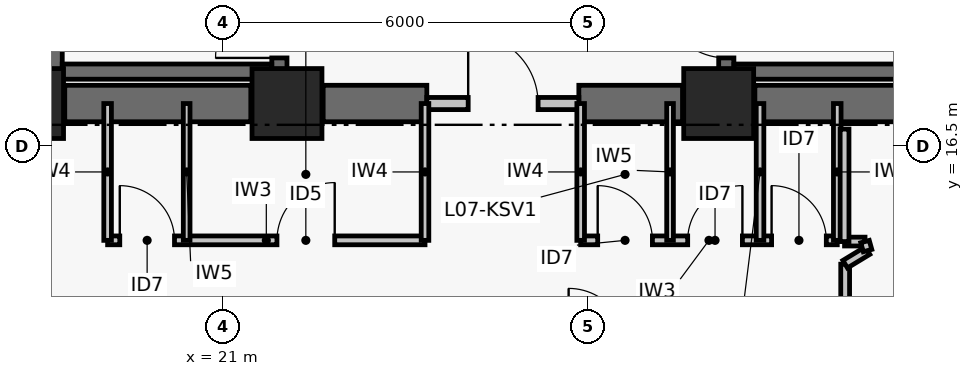
"""IFC4 building model, lengths in metres.
Left out: names, types, materials, properties, quantities, classifications, styles, units other than length and angle.
Written with IfcOpenShell. Run it as: python <this file> out.ifc"""

import sys

from ifc_helpers import new_model, si_unit, direction, frame, frame_2d, origin, origin_2d, place, context, subcontext, project, spatial, rectangle, extrude, element, fill, save


model = new_model("IFC4")
c1 = context("Model", 3, precision=1e-05, world=origin(), true_north=direction((0.0, 1.0)))
c2 = subcontext(c1, "Body", "Model", "MODEL_VIEW")
j1 = project(units=[si_unit("LENGTHUNIT", "METRE"), si_unit("PLANEANGLEUNIT", "RADIAN")], contexts=[c1])
p1 = place(None, origin())
s1 = spatial("IfcSite", under=j1, at=p1, CompositionType="ELEMENT")
p2 = place(p1, origin())
s2 = spatial("IfcBuilding", under=s1, at=p2, CompositionType="ELEMENT")
p3 = place(p2, frame((0.0, 0.0, 35.04)))
s3 = spatial("IfcBuildingStorey", under=s2, at=p3, CompositionType="ELEMENT", Elevation=35.04)
for number, where, z_axis, x_axis in (
    (1, (17.8, 17.2, 0.0), (0.0, 0.0, 1.0), (1.0, 0.0, 0.0)),
    (2, (22.05, 17.2, 0.0), (0.0, 0.0, 1.0), (1.0, 0.0, 0.0)),
    (3, (29.15, 17.2, 0.0), (0.0, 0.0, 1.0), (1.0, 0.0, 0.0)),
):
    element("IfcColumn", number, at=place(p3, frame(where, z_axis=z_axis, x_axis=x_axis)), inside=s3, PredefinedType="COLUMN", context=c2, shape_type="SweptSolid", body=[
        extrude(rectangle(XDim=1.15, YDim=1.15, at=origin_2d()), origin(), (0.0, 0.0, 1.0), 3.72),
    ])
p4 = place(p3, frame((18.395, 17.2, 0.0), z_axis=(0.0, 0.0, 1.0), x_axis=(1.0, 0.0, 0.0)))
e4 = element("IfcWall", 4, at=p4, inside=s3, PredefinedType="SHEAR", context=c2, shape_type="SweptSolid", body=[
    extrude(rectangle(XDim=3.06, YDim=0.6, at=frame_2d((1.53, 0.0))), origin(), (0.0, 0.0, 1.0), 3.47),
])
p5 = place(p3, frame((22.645, 17.2, 0.0), z_axis=(0.0, 0.0, 1.0), x_axis=(1.0, 0.0, 0.0)))
e5 = element("IfcWall", 5, at=p5, inside=s3, PredefinedType="SHEAR", context=c2, shape_type="SweptSolid", body=[
    extrude(rectangle(XDim=1.705, YDim=0.6, at=frame_2d((0.853, 0.0))), origin(), (0.0, 0.0, 1.0), 3.47),
])
p6 = place(p3, frame((26.85, 17.2, 0.0), z_axis=(0.0, 0.0, 1.0), x_axis=(1.0, 0.0, 0.0)))
e6 = element("IfcWall", 6, at=p6, inside=s3, PredefinedType="SHEAR", context=c2, shape_type="SweptSolid", body=[
    extrude(rectangle(XDim=1.705, YDim=0.6, at=frame_2d((0.853, 0.0))), origin(), (0.0, 0.0, 1.0), 3.47),
])
p7 = place(p3, frame((29.745, 17.2, 0.0), z_axis=(0.0, 0.0, 1.0), x_axis=(1.0, 0.0, 0.0)))
e7 = element("IfcWall", 7, at=p7, inside=s3, PredefinedType="SHEAR", context=c2, shape_type="SweptSolid", body=[
    extrude(rectangle(XDim=3.06, YDim=0.6, at=frame_2d((1.53, 0.0))), origin(), (0.0, 0.0, 1.0), 3.47),
])
p8 = place(p3, frame((18.229, 17.6, 0.0), z_axis=(0.0, 0.0, 1.0), x_axis=(0.0, 1.0, 0.0)))
e8 = element("IfcWall", 8, at=p8, inside=s3, PredefinedType="SHEAR", context=c2, shape_type="SweptSolid", body=[
    extrude(rectangle(XDim=8.8, YDim=0.25, at=frame_2d((4.4, 0.0))), origin(), (0.0, 0.0, 1.0), 3.47),
])
p9 = place(p3, frame((21.925, 17.6, 0.0), z_axis=(0.0, 0.0, 1.0), x_axis=(0.0, 1.0, 0.0)))
e9 = element("IfcWall", 9, at=p9, inside=s3, PredefinedType="SHEAR", context=c2, shape_type="SweptSolid", body=[
    extrude(rectangle(XDim=8.8, YDim=0.25, at=frame_2d((4.4, 0.0))), origin(), (0.0, 0.0, 1.0), 3.47),
])
p10 = place(p9, frame((0.35, 0.0, 0.0)))
e10 = element("IfcOpeningElement", 10, at=p10, cuts=e9, PredefinedType="OPENING", context=c2, shape_type="SweptSolid", body=[
    extrude(rectangle(XDim=1.05, YDim=2.08, at=frame_2d((0.525, 1.04))), frame((0.0, 0.135, 0.0), z_axis=(0.0, -1.0, 0.0), x_axis=(1.0, 0.0, 0.0)), (0.0, 0.0, 1.0), 0.27),
])
p11 = place(p3, frame((18.354, 17.725, 0.0), z_axis=(0.0, 0.0, 1.0), x_axis=(1.0, 0.0, 0.0)))
e11 = element("IfcWall", 11, at=p11, inside=s3, PredefinedType="SHEAR", context=c2, shape_type="SweptSolid", body=[
    extrude(rectangle(XDim=3.446, YDim=0.25, at=frame_2d((1.723, 0.0))), origin(), (0.0, 0.0, 1.0), 3.47),
])
p12 = place(p3, frame((29.275, 17.6, 0.0), z_axis=(0.0, 0.0, 1.0), x_axis=(0.0, 1.0, 0.0)))
e12 = element("IfcWall", 12, at=p12, inside=s3, PredefinedType="SHEAR", context=c2, shape_type="SweptSolid", body=[
    extrude(rectangle(XDim=8.8, YDim=0.25, at=frame_2d((4.4, 0.0))), origin(), (0.0, 0.0, 1.0), 3.47),
])
p13 = place(p12, frame((0.35, 0.0, 0.0)))
e13 = element("IfcOpeningElement", 13, at=p13, cuts=e12, PredefinedType="OPENING", context=c2, shape_type="SweptSolid", body=[
    extrude(rectangle(XDim=1.05, YDim=2.08, at=frame_2d((0.525, 1.04))), frame((0.0, 0.135, 0.0), z_axis=(0.0, -1.0, 0.0), x_axis=(1.0, 0.0, 0.0)), (0.0, 0.0, 1.0), 0.27),
])
p14 = place(p3, frame((29.4, 17.725, 0.0), z_axis=(0.0, 0.0, 1.0), x_axis=(1.0, 0.0, 0.0)))
e14 = element("IfcWall", 14, at=p14, inside=s3, PredefinedType="SHEAR", context=c2, shape_type="SweptSolid", body=[
    extrude(rectangle(XDim=3.446, YDim=0.25, at=frame_2d((1.723, 0.0))), origin(), (0.0, 0.0, 1.0), 3.47),
])
p15 = place(p3, frame((24.35, 17.2, 0.0), z_axis=(0.0, 0.0, 1.0), x_axis=(1.0, 0.0, 0.0)))
e15 = element("IfcWall", 15, at=p15, inside=s3, PredefinedType="PARTITIONING", context=c2, shape_type="SweptSolid", body=[
    extrude(rectangle(XDim=2.5, YDim=0.2, at=frame_2d((1.25, 0.0))), origin(), (0.0, 0.0, 1.0), 2.6),
])
p16 = place(p15, frame((0.68, 0.0, 0.0)))
e16 = element("IfcOpeningElement", 16, at=p16, cuts=e15, PredefinedType="OPENING", context=c2, shape_type="SweptSolid", body=[
    extrude(rectangle(XDim=1.15, YDim=2.08, at=frame_2d((0.575, 1.04))), frame((0.0, 0.11, 0.0), z_axis=(0.0, -1.0, 0.0), x_axis=(1.0, 0.0, 0.0)), (0.0, 0.0, 1.0), 0.22),
])
p17 = place(p3, frame((19.1, 14.95, 0.0), z_axis=(0.0, 0.0, 1.0), x_axis=(1.0, 0.0, 0.0)))
e17 = element("IfcWall", 17, at=p17, inside=s3, PredefinedType="PARTITIONING", context=c2, shape_type="SweptSolid", body=[
    extrude(rectangle(XDim=5.22, YDim=0.145, at=frame_2d((2.61, 0.0))), origin(), (0.0, 0.0, 1.0), 2.6),
])
p18 = place(p17, frame((0.2, 0.0, 0.0)))
e18 = element("IfcOpeningElement", 18, at=p18, cuts=e17, PredefinedType="OPENING", context=c2, shape_type="SweptSolid", body=[
    extrude(rectangle(XDim=0.9, YDim=2.02, at=frame_2d((0.45, 1.01))), frame((0.0, 0.083, 0.0), z_axis=(0.0, -1.0, 0.0), x_axis=(1.0, 0.0, 0.0)), (0.0, 0.0, 1.0), 0.165),
])
p19 = place(p17, frame((2.785, 0.0, 0.0)))
e19 = element("IfcOpeningElement", 19, at=p19, cuts=e17, PredefinedType="OPENING", context=c2, shape_type="SweptSolid", body=[
    extrude(rectangle(XDim=0.95, YDim=2.06, at=frame_2d((0.475, 1.03))), frame((0.0, 0.083, 0.0), z_axis=(0.0, -1.0, 0.0), x_axis=(1.0, 0.0, 0.0)), (0.0, 0.0, 1.0), 0.165),
])
p20 = place(p3, frame((26.88, 14.95, 0.0), z_axis=(0.0, 0.0, 1.0), x_axis=(1.0, 0.0, 0.0)))
e20 = element("IfcWall", 20, at=p20, inside=s3, PredefinedType="PARTITIONING", context=c2, shape_type="SweptSolid", body=[
    extrude(rectangle(XDim=4.22, YDim=0.145, at=frame_2d((2.11, 0.0))), origin(), (0.0, 0.0, 1.0), 3.0),
])
p21 = place(p20, frame((0.28, 0.0, 0.0)))
e21 = element("IfcOpeningElement", 21, at=p21, cuts=e20, PredefinedType="OPENING", context=c2, shape_type="SweptSolid", body=[
    extrude(rectangle(XDim=0.9, YDim=2.02, at=frame_2d((0.45, 1.01))), frame((0.0, 0.083, 0.0), z_axis=(0.0, -1.0, 0.0), x_axis=(1.0, 0.0, 0.0)), (0.0, 0.0, 1.0), 0.165),
])
p22 = place(p20, frame((1.76, 0.0, 0.0)))
e22 = element("IfcOpeningElement", 22, at=p22, cuts=e20, PredefinedType="OPENING", context=c2, shape_type="SweptSolid", body=[
    extrude(rectangle(XDim=0.9, YDim=2.02, at=frame_2d((0.45, 1.01))), frame((0.0, 0.083, 0.0), z_axis=(0.0, -1.0, 0.0), x_axis=(1.0, 0.0, 0.0)), (0.0, 0.0, 1.0), 0.165),
])
p23 = place(p20, frame((3.14, 0.0, 0.0)))
e23 = element("IfcOpeningElement", 23, at=p23, cuts=e20, PredefinedType="OPENING", context=c2, shape_type="SweptSolid", body=[
    extrude(rectangle(XDim=0.9, YDim=2.02, at=frame_2d((0.45, 1.01))), frame((0.0, 0.083, 0.0), z_axis=(0.0, -1.0, 0.0), x_axis=(1.0, 0.0, 0.0)), (0.0, 0.0, 1.0), 0.165),
])
p24 = place(p3, frame((19.1, 14.95, 0.0), z_axis=(0.0, 0.0, 1.0), x_axis=(0.0, 1.0, 0.0)))
e24 = element("IfcWall", 24, at=p24, inside=s3, PredefinedType="PARTITIONING", context=c2, shape_type="SweptSolid", body=[
    extrude(rectangle(XDim=2.25, YDim=0.125, at=frame_2d((1.125, 0.0))), origin(), (0.0, 0.0, 1.0), 2.6),
])
p25 = place(p3, frame((20.4, 14.95, 0.0), z_axis=(0.0, 0.0, 1.0), x_axis=(0.0, 1.0, 0.0)))
e25 = element("IfcWall", 25, at=p25, inside=s3, PredefinedType="PARTITIONING", context=c2, shape_type="SweptSolid", body=[
    extrude(rectangle(XDim=2.25, YDim=0.11, at=frame_2d((1.125, 0.0))), origin(), (0.0, 0.0, 1.0), 2.6),
])
for number, where, z_axis, x_axis in (
    (26, (24.32, 14.95, 0.0), (0.0, 0.0, 1.0), (0.0, 1.0, 0.0)),
    (27, (26.88, 14.95, 0.0), (0.0, 0.0, 1.0), (0.0, 1.0, 0.0)),
):
    element("IfcWall", number, at=place(p3, frame(where, z_axis=z_axis, x_axis=x_axis)), inside=s3, PredefinedType="PARTITIONING", context=c2, shape_type="SweptSolid", body=[
        extrude(rectangle(XDim=2.25, YDim=0.125, at=frame_2d((1.125, 0.0))), origin(), (0.0, 0.0, 1.0), 2.6),
    ])
p26 = place(p3, frame((28.35, 14.95, 0.0), z_axis=(0.0, 0.0, 1.0), x_axis=(0.0, 1.0, 0.0)))
e28 = element("IfcWall", 28, at=p26, inside=s3, PredefinedType="PARTITIONING", context=c2, shape_type="SweptSolid", body=[
    extrude(rectangle(XDim=2.25, YDim=0.11, at=frame_2d((1.125, 0.0))), origin(), (0.0, 0.0, 1.0), 2.6),
])
for number, where, z_axis, x_axis in (
    (29, (29.83, 14.95, 0.0), (0.0, 0.0, 1.0), (0.0, 1.0, 0.0)),
    (30, (31.1, 14.95, 0.0), (0.0, 0.0, 1.0), (0.0, 1.0, 0.0)),
):
    element("IfcWall", number, at=place(p3, frame(where, z_axis=z_axis, x_axis=x_axis)), inside=s3, PredefinedType="PARTITIONING", context=c2, shape_type="SweptSolid", body=[
        extrude(rectangle(XDim=2.25, YDim=0.125, at=frame_2d((1.125, 0.0))), origin(), (0.0, 0.0, 1.0), 2.6),
    ])
p27 = place(p3, frame((31.23, 13.29, 0.0), z_axis=(0.0, 0.0, 1.0), x_axis=(0.0, 1.0, 0.0)))
e31 = element("IfcWall", 31, at=p27, inside=s3, PredefinedType="PARTITIONING", context=c2, shape_type="SweptSolid", body=[
    extrude(rectangle(XDim=1.268, YDim=0.145, at=frame_2d((0.634, 0.0))), origin(), (0.0, 0.0, 1.0), 2.85),
])
p28 = place(p3, frame((31.23, 14.558, 0.0), z_axis=(0.0, 0.0, 1.0), x_axis=(0.854931196424, 0.518741408971, 0.0)))
e32 = element("IfcWall", 32, at=p28, inside=s3, PredefinedType="PARTITIONING", context=c2, shape_type="SweptSolid", body=[
    extrude(rectangle(XDim=0.431, YDim=0.145, at=frame_2d((0.215, 0.0))), origin(), (0.0, 0.0, 1.0), 3.0),
])
p29 = place(p3, frame((31.557, 14.93, 0.0), z_axis=(0.0, 0.0, 1.0), x_axis=(-1.0, 0.0, 0.0)))
e33 = element("IfcWall", 33, at=p29, inside=s3, PredefinedType="PARTITIONING", context=c2, shape_type="SweptSolid", body=[
    extrude(rectangle(XDim=0.337, YDim=0.145, at=frame_2d((0.168, 0.0))), origin(), (0.0, 0.0, 1.0), 3.0),
])
p30 = place(p3, frame((31.22, 14.93, 0.0), z_axis=(0.0, 0.0, 1.0), x_axis=(0.0, 1.0, 0.0)))
e34 = element("IfcWall", 34, at=p30, inside=s3, PredefinedType="PARTITIONING", context=c2, shape_type="SweptSolid", body=[
    extrude(rectangle(XDim=1.85, YDim=0.145, at=frame_2d((0.925, 0.0))), origin(), (0.0, 0.0, 1.0), 2.6),
])
p31 = place(p3, frame((31.598, 14.781, 0.0), z_axis=(0.0, 0.0, 1.0), x_axis=(-0.269277388617, 0.963062660464, 0.0)))
e35 = element("IfcWall", 35, at=p31, inside=s3, PredefinedType="PARTITIONING", context=c2, shape_type="SweptSolid", body=[
    extrude(rectangle(XDim=0.154, YDim=0.145, at=frame_2d((0.077, 0.0))), origin(), (0.0, 0.0, 1.0), 3.0),
])
p32 = place(p10, origin())
e36 = element("IfcDoor", 36, at=p32, inside=s3, OperationType="SINGLE_SWING_LEFT", PredefinedType="DOOR", context=c2, shape_type="SweptSolid", body=[
    extrude(rectangle(XDim=1.05, YDim=2.08, at=frame_2d((0.525, 1.04))), frame((0.0, 0.025, 0.0), z_axis=(0.0, -1.0, 0.0), x_axis=(1.0, 0.0, 0.0)), (0.0, 0.0, 1.0), 0.05),
])
fill(e10, e36)
p33 = place(p13, origin())
e37 = element("IfcDoor", 37, at=p33, inside=s3, OperationType="SINGLE_SWING_RIGHT", PredefinedType="DOOR", context=c2, shape_type="SweptSolid", body=[
    extrude(rectangle(XDim=1.05, YDim=2.08, at=frame_2d((0.525, 1.04))), frame((0.0, 0.025, 0.0), z_axis=(0.0, -1.0, 0.0), x_axis=(1.0, 0.0, 0.0)), (0.0, 0.0, 1.0), 0.05),
])
fill(e13, e37)
p34 = place(p16, origin())
e38 = element("IfcDoor", 38, at=p34, inside=s3, OperationType="SINGLE_SWING_LEFT", PredefinedType="DOOR", context=c2, shape_type="SweptSolid", body=[
    extrude(rectangle(XDim=1.15, YDim=2.08, at=frame_2d((0.575, 1.04))), frame((0.0, 0.025, 0.0), z_axis=(0.0, -1.0, 0.0), x_axis=(1.0, 0.0, 0.0)), (0.0, 0.0, 1.0), 0.05),
])
fill(e16, e38)
p35 = place(p18, origin())
e39 = element("IfcDoor", 39, at=p35, inside=s3, OperationType="SINGLE_SWING_LEFT", PredefinedType="DOOR", context=c2, shape_type="SweptSolid", body=[
    extrude(rectangle(XDim=0.9, YDim=2.02, at=frame_2d((0.45, 1.01))), frame((0.0, 0.025, 0.0), z_axis=(0.0, -1.0, 0.0), x_axis=(1.0, 0.0, 0.0)), (0.0, 0.0, 1.0), 0.05),
])
fill(e18, e39)
p36 = place(p19, origin())
e40 = element("IfcDoor", 40, at=p36, inside=s3, OperationType="SINGLE_SWING_RIGHT", PredefinedType="DOOR", context=c2, shape_type="SweptSolid", body=[
    extrude(rectangle(XDim=0.95, YDim=2.06, at=frame_2d((0.475, 1.03))), frame((0.0, 0.025, 0.0), z_axis=(0.0, -1.0, 0.0), x_axis=(1.0, 0.0, 0.0)), (0.0, 0.0, 1.0), 0.05),
])
fill(e19, e40)
p37 = place(p21, origin())
e41 = element("IfcDoor", 41, at=p37, inside=s3, OperationType="SINGLE_SWING_LEFT", PredefinedType="DOOR", context=c2, shape_type="SweptSolid", body=[
    extrude(rectangle(XDim=0.9, YDim=2.02, at=frame_2d((0.45, 1.01))), frame((0.0, 0.025, 0.0), z_axis=(0.0, -1.0, 0.0), x_axis=(1.0, 0.0, 0.0)), (0.0, 0.0, 1.0), 0.05),
])
fill(e21, e41)
p38 = place(p22, origin())
e42 = element("IfcDoor", 42, at=p38, inside=s3, OperationType="SINGLE_SWING_RIGHT", PredefinedType="DOOR", context=c2, shape_type="SweptSolid", body=[
    extrude(rectangle(XDim=0.9, YDim=2.02, at=frame_2d((0.45, 1.01))), frame((0.0, 0.025, 0.0), z_axis=(0.0, -1.0, 0.0), x_axis=(1.0, 0.0, 0.0)), (0.0, 0.0, 1.0), 0.05),
])
fill(e22, e42)
p39 = place(p23, origin())
e43 = element("IfcDoor", 43, at=p39, inside=s3, OperationType="SINGLE_SWING_LEFT", PredefinedType="DOOR", context=c2, shape_type="SweptSolid", body=[
    extrude(rectangle(XDim=0.9, YDim=2.02, at=frame_2d((0.45, 1.01))), frame((0.0, 0.025, 0.0), z_axis=(0.0, -1.0, 0.0), x_axis=(1.0, 0.0, 0.0)), (0.0, 0.0, 1.0), 0.05),
])
fill(e23, e43)
save(model, sys.argv[1])
